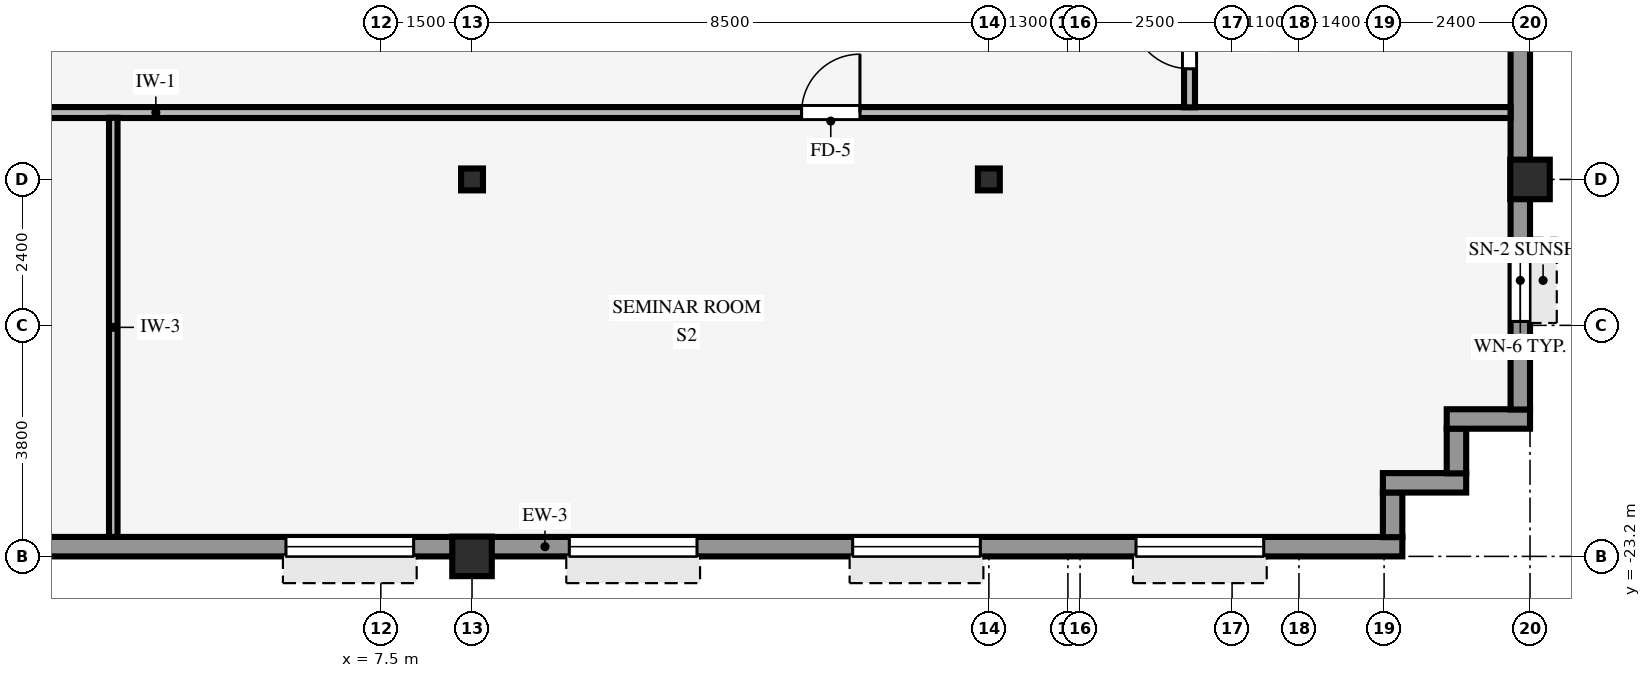
"""IFC4 building model, lengths in metres.
Left out: names, types, materials, properties, quantities, classifications, styles, units other than length and angle.
Written with IfcOpenShell. Run it as: python <this file> out.ifc"""

import sys

from ifc_helpers import new_model, si_unit, direction, frame, frame_2d, origin, origin_2d, place, context, subcontext, project, spatial, rectangle, hollow_rectangle, i_section, extrude, source, transform, mapped, element, fill, save


model = new_model("IFC4")
c1 = context("Model", 3, precision=1e-05, world=origin(), true_north=direction((0.0, 1.0)))
c2 = subcontext(c1, "Body", "Model", "MODEL_VIEW")
j1 = project(units=[si_unit("LENGTHUNIT", "METRE"), si_unit("PLANEANGLEUNIT", "RADIAN")], contexts=[c1])
p1 = place(None, origin())
s1 = spatial("IfcSite", under=j1, at=p1, CompositionType="ELEMENT")
p2 = place(p1, origin())
s2 = spatial("IfcBuilding", under=s1, at=p2, CompositionType="ELEMENT")
p3 = place(p2, frame((0.0, 0.0, 138.45)))
s3 = spatial("IfcBuildingStorey", under=s2, at=p3, CompositionType="ELEMENT", Elevation=138.45)
for number, where, z_axis, x_axis in (
    (1, (26.4, -17.0, 0.0), (0.0, 0.0, 1.0), (1.0, 0.0, 0.0)),
    (2, (9.0, -23.2, 0.0), (0.0, 0.0, 1.0), (1.0, 0.0, 0.0)),
):
    element("IfcColumn", number, at=place(p3, frame(where, z_axis=z_axis, x_axis=x_axis)), inside=s3, PredefinedType="COLUMN", context=c2, shape_type="SweptSolid", body=[
        extrude(hollow_rectangle(XDim=0.65, YDim=0.65, WallThickness=0.04, InnerFilletRadius=0.04, OuterFilletRadius=0.08, at=origin_2d()), origin(), (0.0, 0.0, 1.0), 3.37),
    ])
for number, where, z_axis, x_axis in (
    (3, (9.0, -17.0, 0.0), (0.0, 0.0, 1.0), (1.0, 0.0, 0.0)),
    (4, (17.5, -17.0, 0.0), (0.0, 0.0, 1.0), (1.0, 0.0, 0.0)),
):
    element("IfcColumn", number, at=place(p3, frame(where, z_axis=z_axis, x_axis=x_axis)), inside=s3, PredefinedType="COLUMN", context=c2, shape_type="SweptSolid", body=[
        extrude(i_section(OverallWidth=0.36, OverallDepth=0.36, WebThickness=0.021, FlangeThickness=0.021, FilletRadius=0.018, at=origin_2d()), origin(), (0.0, 0.0, 1.0), 3.37),
    ])
p4 = place(p3, frame((-24.3, -23.04, 0.0), z_axis=(0.0, 0.0, 1.0), x_axis=(1.0, 0.0, 0.0)))
e5 = element("IfcWall", 5, at=p4, inside=s3, PredefinedType="STANDARD", context=c2, shape_type="SweptSolid", body=[
    extrude(rectangle(XDim=48.6, YDim=0.32, at=frame_2d((24.3, 0.0))), origin(), (0.0, 0.0, 1.0), 2.705),
])
p5 = place(p4, frame((19.98, 0.0, 0.0), z_axis=(0.0, 0.0, 1.0), x_axis=(-1.0, 0.0, 0.0)))
e6 = element("IfcOpeningElement", 6, at=p5, cuts=e5, PredefinedType="OPENING", context=c2, shape_type="SweptSolid", body=[
    extrude(rectangle(XDim=0.98, YDim=2.15, at=frame_2d((0.49, 1.075))), frame((0.0, 0.17, 0.0), z_axis=(0.0, -1.0, 0.0), x_axis=(1.0, 0.0, 0.0)), (0.0, 0.0, 1.0), 0.34),
])
p6 = place(p4, frame((2.28, 0.0, 0.8)))
e7 = element("IfcOpeningElement", 7, at=p6, cuts=e5, PredefinedType="OPENING", context=c2, shape_type="SweptSolid", body=[
    extrude(rectangle(XDim=2.1, YDim=1.56, at=frame_2d((1.05, 0.78))), frame((0.0, 0.17, 0.0), z_axis=(0.0, -1.0, 0.0), x_axis=(1.0, 0.0, 0.0)), (0.0, 0.0, 1.0), 0.34),
])
p7 = place(p4, frame((6.94, 0.0, 0.8)))
e8 = element("IfcOpeningElement", 8, at=p7, cuts=e5, PredefinedType="OPENING", context=c2, shape_type="SweptSolid", body=[
    extrude(rectangle(XDim=2.1, YDim=1.56, at=frame_2d((1.05, 0.78))), frame((0.0, 0.17, 0.0), z_axis=(0.0, -1.0, 0.0), x_axis=(1.0, 0.0, 0.0)), (0.0, 0.0, 1.0), 0.34),
])
p8 = place(p4, frame((11.6, 0.0, 0.8)))
e9 = element("IfcOpeningElement", 9, at=p8, cuts=e5, PredefinedType="OPENING", context=c2, shape_type="SweptSolid", body=[
    extrude(rectangle(XDim=2.1, YDim=1.56, at=frame_2d((1.05, 0.78))), frame((0.0, 0.17, 0.0), z_axis=(0.0, -1.0, 0.0), x_axis=(1.0, 0.0, 0.0)), (0.0, 0.0, 1.0), 0.34),
])
p9 = place(p4, frame((16.26, 0.0, 0.8)))
e10 = element("IfcOpeningElement", 10, at=p9, cuts=e5, PredefinedType="OPENING", context=c2, shape_type="SweptSolid", body=[
    extrude(rectangle(XDim=2.1, YDim=1.56, at=frame_2d((1.05, 0.78))), frame((0.0, 0.17, 0.0), z_axis=(0.0, -1.0, 0.0), x_axis=(1.0, 0.0, 0.0)), (0.0, 0.0, 1.0), 0.34),
])
p10 = place(p4, frame((20.92, 0.0, 0.8)))
e11 = element("IfcOpeningElement", 11, at=p10, cuts=e5, PredefinedType="OPENING", context=c2, shape_type="SweptSolid", body=[
    extrude(rectangle(XDim=2.1, YDim=1.56, at=frame_2d((1.05, 0.78))), frame((0.0, 0.17, 0.0), z_axis=(0.0, -1.0, 0.0), x_axis=(1.0, 0.0, 0.0)), (0.0, 0.0, 1.0), 0.34),
])
p11 = place(p4, frame((30.24, 0.0, 0.8)))
e12 = element("IfcOpeningElement", 12, at=p11, cuts=e5, PredefinedType="OPENING", context=c2, shape_type="SweptSolid", body=[
    extrude(rectangle(XDim=2.1, YDim=1.56, at=frame_2d((1.05, 0.78))), frame((0.0, 0.17, 0.0), z_axis=(0.0, -1.0, 0.0), x_axis=(1.0, 0.0, 0.0)), (0.0, 0.0, 1.0), 0.34),
])
p12 = place(p4, frame((34.9, 0.0, 0.8)))
e13 = element("IfcOpeningElement", 13, at=p12, cuts=e5, PredefinedType="OPENING", context=c2, shape_type="SweptSolid", body=[
    extrude(rectangle(XDim=2.1, YDim=1.56, at=frame_2d((1.05, 0.78))), frame((0.0, 0.17, 0.0), z_axis=(0.0, -1.0, 0.0), x_axis=(1.0, 0.0, 0.0)), (0.0, 0.0, 1.0), 0.34),
])
p13 = place(p4, frame((39.56, 0.0, 0.8)))
e14 = element("IfcOpeningElement", 14, at=p13, cuts=e5, PredefinedType="OPENING", context=c2, shape_type="SweptSolid", body=[
    extrude(rectangle(XDim=2.1, YDim=1.56, at=frame_2d((1.05, 0.78))), frame((0.0, 0.17, 0.0), z_axis=(0.0, -1.0, 0.0), x_axis=(1.0, 0.0, 0.0)), (0.0, 0.0, 1.0), 0.34),
])
p14 = place(p4, frame((44.22, 0.0, 0.8)))
e15 = element("IfcOpeningElement", 15, at=p14, cuts=e5, PredefinedType="OPENING", context=c2, shape_type="SweptSolid", body=[
    extrude(rectangle(XDim=2.1, YDim=1.56, at=frame_2d((1.05, 0.78))), frame((0.0, 0.17, 0.0), z_axis=(0.0, -1.0, 0.0), x_axis=(1.0, 0.0, 0.0)), (0.0, 0.0, 1.0), 0.34),
])
p15 = place(p3, frame((24.14, -22.884, 0.0), z_axis=(0.0, 0.0, 1.0), x_axis=(0.0, 1.0, 0.0)))
e16 = element("IfcWall", 16, at=p15, inside=s3, PredefinedType="STANDARD", context=c2, shape_type="SweptSolid", body=[
    extrude(rectangle(XDim=0.738, YDim=0.32, at=frame_2d((0.369, 0.0))), origin(), (0.0, 0.0, 1.0), 3.36),
])
p16 = place(p3, frame((23.98, -21.99, 0.0), z_axis=(0.0, 0.0, 1.0), x_axis=(1.0, 0.0, 0.0)))
e17 = element("IfcWall", 17, at=p16, inside=s3, PredefinedType="STANDARD", context=c2, shape_type="SweptSolid", body=[
    extrude(rectangle(XDim=1.37, YDim=0.32, at=frame_2d((0.685, 0.0))), origin(), (0.0, 0.0, 1.0), 3.36),
])
p17 = place(p3, frame((25.19, -21.834, 0.0), z_axis=(0.0, 0.0, 1.0), x_axis=(0.0, 1.0, 0.0)))
e18 = element("IfcWall", 18, at=p17, inside=s3, PredefinedType="STANDARD", context=c2, shape_type="SweptSolid", body=[
    extrude(rectangle(XDim=0.738, YDim=0.32, at=frame_2d((0.369, 0.0))), origin(), (0.0, 0.0, 1.0), 3.36),
])
p18 = place(p3, frame((25.03, -20.94, 0.0), z_axis=(0.0, 0.0, 1.0), x_axis=(1.0, 0.0, 0.0)))
e19 = element("IfcWall", 19, at=p18, inside=s3, PredefinedType="STANDARD", context=c2, shape_type="SweptSolid", body=[
    extrude(rectangle(XDim=1.37, YDim=0.32, at=frame_2d((0.685, 0.0))), origin(), (0.0, 0.0, 1.0), 3.36),
])
p19 = place(p3, frame((26.24, -20.784, 0.0), z_axis=(0.0, 0.0, 1.0), x_axis=(0.0, 1.0, 0.0)))
e20 = element("IfcWall", 20, at=p19, inside=s3, PredefinedType="STANDARD", context=c2, shape_type="SweptSolid", body=[
    extrude(rectangle(XDim=41.568, YDim=0.32, at=frame_2d((20.784, 0.0))), origin(), (0.0, 0.0, 1.0), 2.705),
])
p20 = place(p19, frame((1.448, 0.0, 0.8)))
e21 = element("IfcOpeningElement", 21, at=p20, cuts=e20, PredefinedType="OPENING", context=c2, shape_type="SweptSolid", body=[
    extrude(rectangle(XDim=1.35, YDim=1.56, at=frame_2d((0.675, 0.78))), frame((0.0, 0.17, 0.0), z_axis=(0.0, -1.0, 0.0), x_axis=(1.0, 0.0, 0.0)), (0.0, 0.0, 1.0), 0.34),
])
p21 = place(p19, frame((7.744, 0.0, 0.8)))
e22 = element("IfcOpeningElement", 22, at=p21, cuts=e20, PredefinedType="OPENING", context=c2, shape_type="SweptSolid", body=[
    extrude(rectangle(XDim=1.35, YDim=1.56, at=frame_2d((0.675, 0.78))), frame((0.0, 0.17, 0.0), z_axis=(0.0, -1.0, 0.0), x_axis=(1.0, 0.0, 0.0)), (0.0, 0.0, 1.0), 0.34),
])
p22 = place(p19, frame((12.69, 0.0, 0.8)))
e23 = element("IfcOpeningElement", 23, at=p22, cuts=e20, PredefinedType="OPENING", context=c2, shape_type="SweptSolid", body=[
    extrude(rectangle(XDim=1.35, YDim=1.56, at=frame_2d((0.675, 0.78))), frame((0.0, 0.17, 0.0), z_axis=(0.0, -1.0, 0.0), x_axis=(1.0, 0.0, 0.0)), (0.0, 0.0, 1.0), 0.34),
])
p23 = place(p19, frame((17.636, 0.0, 0.8)))
e24 = element("IfcOpeningElement", 24, at=p23, cuts=e20, PredefinedType="OPENING", context=c2, shape_type="SweptSolid", body=[
    extrude(rectangle(XDim=1.35, YDim=1.56, at=frame_2d((0.675, 0.78))), frame((0.0, 0.17, 0.0), z_axis=(0.0, -1.0, 0.0), x_axis=(1.0, 0.0, 0.0)), (0.0, 0.0, 1.0), 0.34),
])
p24 = place(p19, frame((22.582, 0.0, 0.8)))
e25 = element("IfcOpeningElement", 25, at=p24, cuts=e20, PredefinedType="OPENING", context=c2, shape_type="SweptSolid", body=[
    extrude(rectangle(XDim=1.35, YDim=1.56, at=frame_2d((0.675, 0.78))), frame((0.0, 0.17, 0.0), z_axis=(0.0, -1.0, 0.0), x_axis=(1.0, 0.0, 0.0)), (0.0, 0.0, 1.0), 0.34),
])
p25 = place(p19, frame((27.528, 0.0, 0.8)))
e26 = element("IfcOpeningElement", 26, at=p25, cuts=e20, PredefinedType="OPENING", context=c2, shape_type="SweptSolid", body=[
    extrude(rectangle(XDim=1.35, YDim=1.56, at=frame_2d((0.675, 0.78))), frame((0.0, 0.17, 0.0), z_axis=(0.0, -1.0, 0.0), x_axis=(1.0, 0.0, 0.0)), (0.0, 0.0, 1.0), 0.34),
])
p26 = place(p19, frame((32.474, 0.0, 0.8)))
e27 = element("IfcOpeningElement", 27, at=p26, cuts=e20, PredefinedType="OPENING", context=c2, shape_type="SweptSolid", body=[
    extrude(rectangle(XDim=1.35, YDim=1.56, at=frame_2d((0.675, 0.78))), frame((0.0, 0.17, 0.0), z_axis=(0.0, -1.0, 0.0), x_axis=(1.0, 0.0, 0.0)), (0.0, 0.0, 1.0), 0.34),
])
p27 = place(p19, frame((38.77, 0.0, 0.8)))
e28 = element("IfcOpeningElement", 28, at=p27, cuts=e20, PredefinedType="OPENING", context=c2, shape_type="SweptSolid", body=[
    extrude(rectangle(XDim=1.35, YDim=1.56, at=frame_2d((0.675, 0.78))), frame((0.0, 0.17, 0.0), z_axis=(0.0, -1.0, 0.0), x_axis=(1.0, 0.0, 0.0)), (0.0, 0.0, 1.0), 0.34),
])
p28 = place(p3, frame((-26.08, -15.9, 0.0), z_axis=(0.0, 0.0, 1.0), x_axis=(1.0, 0.0, 0.0)))
e29 = element("IfcWall", 29, at=p28, inside=s3, PredefinedType="PARTITIONING", context=c2, shape_type="SweptSolid", body=[
    extrude(rectangle(XDim=52.16, YDim=0.18, at=frame_2d((26.08, 0.0))), origin(), (0.0, 0.0, 1.0), 3.36),
])
p29 = place(p28, frame((18.3, 0.0, 0.0)))
e30 = element("IfcOpeningElement", 30, at=p29, cuts=e29, PredefinedType="OPENING", context=c2, shape_type="SweptSolid", body=[
    extrude(rectangle(XDim=0.96, YDim=2.1, at=frame_2d((0.48, 1.05))), frame((0.0, 0.1, 0.0), z_axis=(0.0, -1.0, 0.0), x_axis=(1.0, 0.0, 0.0)), (0.0, 0.0, 1.0), 0.2),
])
p30 = place(p28, frame((40.5, 0.0, 0.0)))
e31 = element("IfcOpeningElement", 31, at=p30, cuts=e29, PredefinedType="OPENING", context=c2, shape_type="SweptSolid", body=[
    extrude(rectangle(XDim=0.96, YDim=2.1, at=frame_2d((0.48, 1.05))), frame((0.0, 0.1, 0.0), z_axis=(0.0, -1.0, 0.0), x_axis=(1.0, 0.0, 0.0)), (0.0, 0.0, 1.0), 0.2),
])
p31 = place(p3, frame((3.1, -22.88, 0.0), z_axis=(0.0, 0.0, 1.0), x_axis=(0.0, 1.0, 0.0)))
e32 = element("IfcWall", 32, at=p31, inside=s3, PredefinedType="PARTITIONING", context=c2, shape_type="SweptSolid", body=[
    extrude(rectangle(XDim=6.894, YDim=0.14, at=frame_2d((3.447, 0.0))), origin(), (0.0, 0.0, 1.0), 3.36),
])
p32 = place(p3, frame((20.8, -15.814, 0.0), z_axis=(0.0, 0.0, 1.0), x_axis=(0.0, 1.0, 0.0)))
e33 = element("IfcWall", 33, at=p32, inside=s3, PredefinedType="PARTITIONING", context=c2, shape_type="SweptSolid", body=[
    extrude(rectangle(XDim=2.228, YDim=0.18, at=frame_2d((1.114, 0.0))), origin(), (0.0, 0.0, 1.0), 3.36),
])
p33 = place(p32, frame((0.634, 0.0, 0.0)))
e34 = element("IfcOpeningElement", 34, at=p33, cuts=e33, PredefinedType="OPENING", context=c2, shape_type="SweptSolid", body=[
    extrude(rectangle(XDim=0.96, YDim=2.1, at=frame_2d((0.48, 1.05))), frame((0.0, 0.1, 0.0), z_axis=(0.0, -1.0, 0.0), x_axis=(1.0, 0.0, 0.0)), (0.0, 0.0, 1.0), 0.2),
])
m1 = source(origin(), c2, "Body", "SweptSolid", [
    extrude(rectangle(XDim=2.1, YDim=1.56, at=frame_2d((1.05, 0.78))), frame((0.0, 0.03, 0.0), z_axis=(0.0, -1.0, 0.0), x_axis=(1.0, 0.0, 0.0)), (0.0, 0.0, 1.0), 0.06),
])
p34 = place(p11, origin())
e35 = element("IfcWindow", 35, at=p34, inside=s3, PartitioningType="SINGLE_PANEL", PredefinedType="WINDOW", context=c2, shape_type="MappedRepresentation", body=[
    mapped(m1, transform((0.0, 0.0, 0.0), scale=1.0)),
])
fill(e12, e35)
p35 = place(p12, origin())
e36 = element("IfcWindow", 36, at=p35, inside=s3, PartitioningType="SINGLE_PANEL", PredefinedType="WINDOW", context=c2, shape_type="MappedRepresentation", body=[
    mapped(m1, transform((0.0, 0.0, 0.0), scale=1.0)),
])
fill(e13, e36)
p36 = place(p13, origin())
e37 = element("IfcWindow", 37, at=p36, inside=s3, PartitioningType="SINGLE_PANEL", PredefinedType="WINDOW", context=c2, shape_type="MappedRepresentation", body=[
    mapped(m1, transform((0.0, 0.0, 0.0), scale=1.0)),
])
fill(e14, e37)
p37 = place(p14, origin())
e38 = element("IfcWindow", 38, at=p37, inside=s3, PartitioningType="SINGLE_PANEL", PredefinedType="WINDOW", context=c2, shape_type="MappedRepresentation", body=[
    mapped(m1, transform((0.0, 0.0, 0.0), scale=1.0)),
])
fill(e15, e38)
m2 = source(origin(), c2, "Body", "SweptSolid", [
    extrude(rectangle(XDim=1.35, YDim=1.56, at=frame_2d((0.675, 0.78))), frame((0.0, 0.03, 0.0), z_axis=(0.0, -1.0, 0.0), x_axis=(1.0, 0.0, 0.0)), (0.0, 0.0, 1.0), 0.06),
])
p38 = place(p20, origin())
e39 = element("IfcWindow", 39, at=p38, inside=s3, PartitioningType="SINGLE_PANEL", PredefinedType="WINDOW", context=c2, shape_type="MappedRepresentation", body=[
    mapped(m2, transform((0.0, 0.0, 0.0), scale=1.0)),
])
fill(e21, e39)
m3 = source(origin(), c2, "Body", "SweptSolid", [
    extrude(rectangle(XDim=0.96, YDim=2.1, at=frame_2d((0.48, 1.05))), frame((0.0, 0.025, 0.0), z_axis=(0.0, -1.0, 0.0), x_axis=(1.0, 0.0, 0.0)), (0.0, 0.0, 1.0), 0.05),
])
p39 = place(p30, origin())
e40 = element("IfcDoor", 40, at=p39, inside=s3, OperationType="SINGLE_SWING_RIGHT", PredefinedType="DOOR", context=c2, shape_type="MappedRepresentation", body=[
    mapped(m3, transform((0.0, 0.0, 0.0), scale=1.0)),
])
fill(e31, e40)
p40 = place(p33, origin())
e41 = element("IfcDoor", 41, at=p40, inside=s3, OperationType="SINGLE_SWING_RIGHT", PredefinedType="DOOR", context=c2, shape_type="MappedRepresentation", body=[
    mapped(m3, transform((0.0, 0.0, 0.0), scale=1.0)),
])
fill(e34, e41)
save(model, sys.argv[1])
